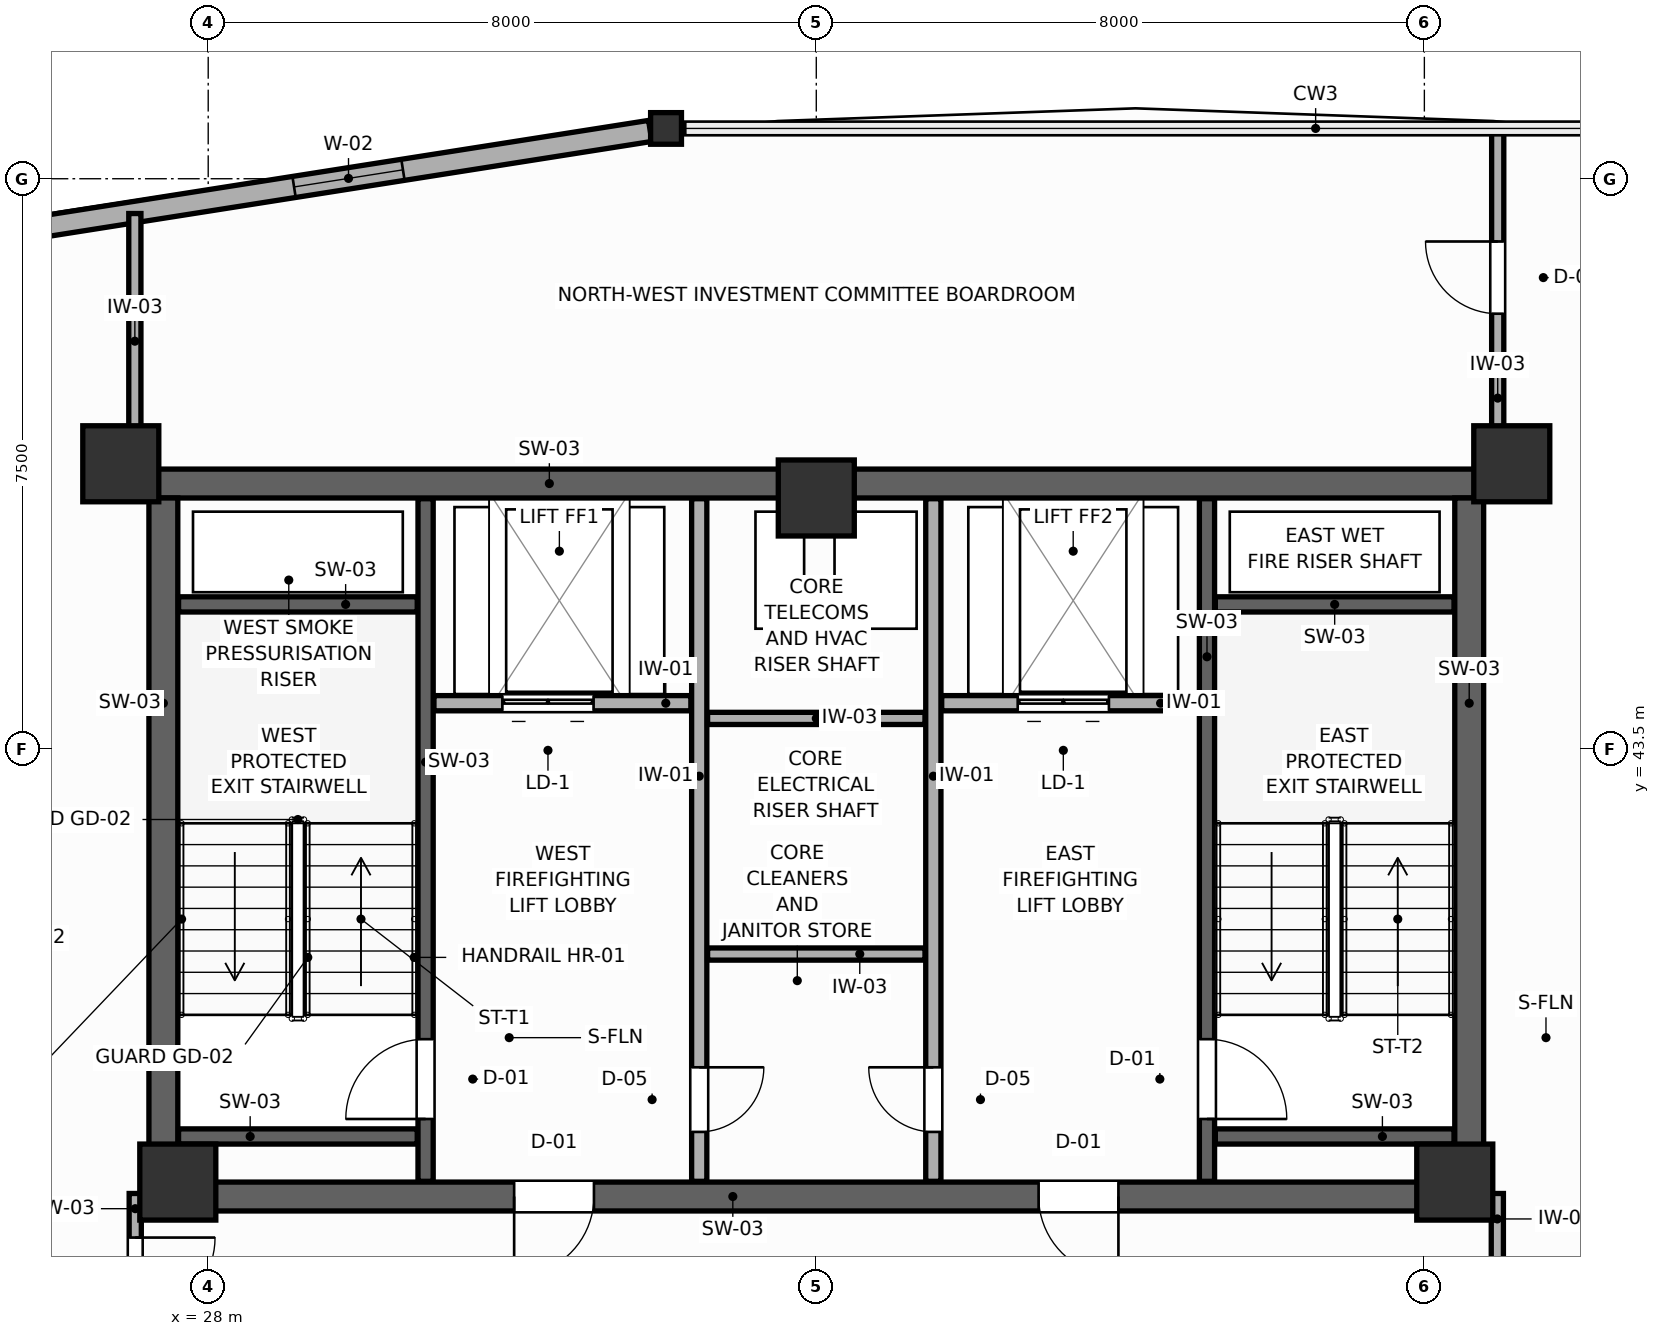
"""IFC4 building model, lengths in metres.
Left out: names, types, materials, properties, quantities, classifications, styles, units other than length and angle.
Written with IfcOpenShell. Run it as: python <this file> out.ifc"""

import sys

from ifc_helpers import new_model, si_unit, direction, frame, frame_2d, origin, origin_2d, place, context, subcontext, project, spatial, rectangle, i_section, extrude, source, transform, mapped, element, fill, save


model = new_model("IFC4")
c1 = context("Model", 3, precision=1e-05, world=origin(), true_north=direction((0.0, 1.0)))
c2 = subcontext(c1, "Body", "Model", "MODEL_VIEW")
j1 = project(units=[si_unit("LENGTHUNIT", "METRE"), si_unit("PLANEANGLEUNIT", "RADIAN")], contexts=[c1])
p1 = place(None, origin())
s1 = spatial("IfcSite", under=j1, at=p1, CompositionType="ELEMENT")
p2 = place(p1, origin())
s2 = spatial("IfcBuilding", under=s1, at=p2, CompositionType="ELEMENT")
p3 = place(p2, frame((0.0, 0.0, 209.4)))
s3 = spatial("IfcBuildingStorey", under=s2, at=p3, CompositionType="ELEMENT", Elevation=209.4)
p4 = place(p3, frame((27.22, 46.99, 0.0), z_axis=(0.0, 0.0, 1.0), x_axis=(1.0, 0.0, 0.0)))
e1 = element("IfcWall", 1, at=p4, inside=s3, PredefinedType="SHEAR", context=c2, shape_type="SweptSolid", body=[
    extrude(rectangle(XDim=17.56, YDim=0.38, at=frame_2d((8.78, 0.0))), origin(), (0.0, 0.0, 1.0), 3.6),
])
p5 = place(p3, frame((27.22, 37.61, 0.0), z_axis=(0.0, 0.0, 1.0), x_axis=(1.0, 0.0, 0.0)))
e2 = element("IfcWall", 2, at=p5, inside=s3, PredefinedType="SHEAR", context=c2, shape_type="SweptSolid", body=[
    extrude(rectangle(XDim=17.56, YDim=0.38, at=frame_2d((8.78, 0.0))), origin(), (0.0, 0.0, 1.0), 3.6),
])
p6 = place(p5, frame((4.805, 0.0, 0.0)))
e3 = element("IfcOpeningElement", 3, at=p6, cuts=e2, PredefinedType="OPENING", context=c2, shape_type="SweptSolid", body=[
    extrude(rectangle(XDim=1.05, YDim=2.1, at=frame_2d((0.525, 1.05))), frame((0.0, 0.2, 0.0), z_axis=(0.0, -1.0, 0.0), x_axis=(1.0, 0.0, 0.0)), (0.0, 0.0, 1.0), 0.4),
])
p7 = place(p5, frame((11.705, 0.0, 0.0)))
e4 = element("IfcOpeningElement", 4, at=p7, cuts=e2, PredefinedType="OPENING", context=c2, shape_type="SweptSolid", body=[
    extrude(rectangle(XDim=1.05, YDim=2.1, at=frame_2d((0.525, 1.05))), frame((0.0, 0.2, 0.0), z_axis=(0.0, -1.0, 0.0), x_axis=(1.0, 0.0, 0.0)), (0.0, 0.0, 1.0), 0.4),
])
for number, where, z_axis, x_axis in (
    (5, (27.41, 37.8, 0.0), (0.0, 0.0, 1.0), (0.0, 1.0, 0.0)),
    (6, (44.59, 37.8, 0.0), (0.0, 0.0, 1.0), (0.0, 1.0, 0.0)),
):
    element("IfcWall", number, at=place(p3, frame(where, z_axis=z_axis, x_axis=x_axis)), inside=s3, PredefinedType="SHEAR", context=c2, shape_type="SweptSolid", body=[
        extrude(rectangle(XDim=9.0, YDim=0.38, at=frame_2d((4.5, 0.0))), origin(), (0.0, 0.0, 1.0), 3.6),
    ])
m1 = source(origin(), c2, "Body", "SweptSolid", [
    extrude(rectangle(XDim=1.0, YDim=1.0, at=origin_2d()), origin(), (0.0, 0.0, 1.0), 3.6),
])
for number, where, z_axis, x_axis in (
    (7, (26.85, 47.25, 0.0), (0.0, 0.0, 1.0), (1.0, 0.0, 0.0)),
    (8, (45.15, 47.25, 0.0), (0.0, 0.0, 1.0), (1.0, 0.0, 0.0)),
    (9, (27.6, 37.8, 0.0), (0.0, 0.0, 1.0), (1.0, 0.0, 0.0)),
    (10, (44.4, 37.8, 0.0), (0.0, 0.0, 1.0), (1.0, 0.0, 0.0)),
    (11, (36.0, 46.8, 0.0), (0.0, 0.0, 1.0), (1.0, 0.0, 0.0)),
):
    element("IfcColumn", number, at=place(p3, frame(where, z_axis=z_axis, x_axis=x_axis)), inside=s3, PredefinedType="COLUMN", context=c2, shape_type="MappedRepresentation", body=[
        mapped(m1, transform((0.0, 0.0, 0.0), scale=1.0)),
    ])
m2 = source(origin(), c2, "Body", "SweptSolid", [
    extrude(i_section(OverallWidth=0.406, OverallDepth=0.416, WebThickness=0.027, FlangeThickness=0.044, FilletRadius=0.015, at=origin_2d()), origin(), (0.0, 0.0, 1.0), 3.6),
])
p8 = place(p3, frame((34.023, 51.662, 0.0), z_axis=(0.0, 0.0, 1.0), x_axis=(1.0, 0.0, 0.0)))
e12 = element("IfcColumn", 12, at=p8, inside=s3, PredefinedType="COLUMN", context=c2, shape_type="MappedRepresentation", body=[
    mapped(m2, transform((0.0, 0.0, 0.0), scale=1.0)),
])
p9 = place(p3, frame((33.815, 51.629, 0.0), z_axis=(0.0, 0.0, 1.0), x_axis=(-0.987848165878, -0.155422009936, 0.0)))
e13 = element("IfcWall", 13, at=p9, inside=s3, PredefinedType="SOLIDWALL", context=c2, shape_type="SweptSolid", body=[
    extrude(rectangle(XDim=13.823, YDim=0.28, at=frame_2d((6.912, 0.0))), origin(), (0.0, 0.0, 1.0), 2.96),
])
p10 = place(p9, frame((3.293, 0.0, 0.75)))
e14 = element("IfcOpeningElement", 14, at=p10, cuts=e13, PredefinedType="OPENING", context=c2, shape_type="SweptSolid", body=[
    extrude(rectangle(XDim=1.45, YDim=1.65, at=frame_2d((0.725, 0.825))), frame((0.0, 0.15, 0.0), z_axis=(0.0, -1.0, 0.0), x_axis=(1.0, 0.0, 0.0)), (0.0, 0.0, 1.0), 0.3),
])
p11 = place(p3, frame((30.86, 37.81, 0.0), z_axis=(0.0, 0.0, 1.0), x_axis=(0.0, 1.0, 0.0)))
e15 = element("IfcWall", 15, at=p11, inside=s3, PredefinedType="SHEAR", context=c2, shape_type="SweptSolid", body=[
    extrude(rectangle(XDim=8.98, YDim=0.2, at=frame_2d((4.49, 0.0))), origin(), (0.0, 0.0, 1.0), 3.6),
])
p12 = place(p11, frame((0.82, 0.0, 0.0)))
e16 = element("IfcOpeningElement", 16, at=p12, cuts=e15, PredefinedType="OPENING", context=c2, shape_type="SweptSolid", body=[
    extrude(rectangle(XDim=1.05, YDim=2.1, at=frame_2d((0.525, 1.05))), frame((0.0, 0.11, 0.0), z_axis=(0.0, -1.0, 0.0), x_axis=(1.0, 0.0, 0.0)), (0.0, 0.0, 1.0), 0.22),
])
for number, where, z_axis, x_axis in (
    (17, (27.61, 45.4, 0.0), (0.0, 0.0, 1.0), (1.0, 0.0, 0.0)),
    (18, (27.61, 38.4, 0.0), (0.0, 0.0, 1.0), (1.0, 0.0, 0.0)),
):
    element("IfcWall", number, at=place(p3, frame(where, z_axis=z_axis, x_axis=x_axis)), inside=s3, PredefinedType="SHEAR", context=c2, shape_type="SweptSolid", body=[
        extrude(rectangle(XDim=3.14, YDim=0.2, at=frame_2d((1.57, 0.0))), origin(), (0.0, 0.0, 1.0), 3.6),
    ])
p13 = place(p3, frame((41.14, 37.81, 0.0), z_axis=(0.0, 0.0, 1.0), x_axis=(0.0, 1.0, 0.0)))
e19 = element("IfcWall", 19, at=p13, inside=s3, PredefinedType="SHEAR", context=c2, shape_type="SweptSolid", body=[
    extrude(rectangle(XDim=8.98, YDim=0.2, at=frame_2d((4.49, 0.0))), origin(), (0.0, 0.0, 1.0), 3.6),
])
p14 = place(p13, frame((0.82, 0.0, 0.0)))
e20 = element("IfcOpeningElement", 20, at=p14, cuts=e19, PredefinedType="OPENING", context=c2, shape_type="SweptSolid", body=[
    extrude(rectangle(XDim=1.05, YDim=2.1, at=frame_2d((0.525, 1.05))), frame((0.0, 0.11, 0.0), z_axis=(0.0, -1.0, 0.0), x_axis=(1.0, 0.0, 0.0)), (0.0, 0.0, 1.0), 0.22),
])
for number, where, z_axis, x_axis in (
    (21, (41.25, 45.4, 0.0), (0.0, 0.0, 1.0), (1.0, 0.0, 0.0)),
    (22, (41.25, 38.4, 0.0), (0.0, 0.0, 1.0), (1.0, 0.0, 0.0)),
):
    element("IfcWall", number, at=place(p3, frame(where, z_axis=z_axis, x_axis=x_axis)), inside=s3, PredefinedType="SHEAR", context=c2, shape_type="SweptSolid", body=[
        extrude(rectangle(XDim=3.14, YDim=0.2, at=frame_2d((1.57, 0.0))), origin(), (0.0, 0.0, 1.0), 3.6),
    ])
p15 = place(p3, frame((30.97, 44.1, 0.0), z_axis=(0.0, 0.0, 1.0), x_axis=(1.0, 0.0, 0.0)))
e23 = element("IfcWall", 23, at=p15, inside=s3, PredefinedType="PARTITIONING", context=c2, shape_type="SweptSolid", body=[
    extrude(rectangle(XDim=3.38, YDim=0.2, at=frame_2d((1.69, 0.0))), origin(), (0.0, 0.0, 1.0), 3.41),
])
p16 = place(p15, frame((0.9, 0.0, 0.0)))
e24 = element("IfcOpeningElement", 24, at=p16, cuts=e23, PredefinedType="OPENING", context=c2, shape_type="SweptSolid", body=[
    extrude(rectangle(XDim=1.2, YDim=2.1, at=frame_2d((0.6, 1.05))), frame((0.0, 0.11, 0.0), z_axis=(0.0, -1.0, 0.0), x_axis=(1.0, 0.0, 0.0)), (0.0, 0.0, 1.0), 0.22),
])
p17 = place(p3, frame((37.65, 44.1, 0.0), z_axis=(0.0, 0.0, 1.0), x_axis=(1.0, 0.0, 0.0)))
e25 = element("IfcWall", 25, at=p17, inside=s3, PredefinedType="PARTITIONING", context=c2, shape_type="SweptSolid", body=[
    extrude(rectangle(XDim=3.38, YDim=0.2, at=frame_2d((1.69, 0.0))), origin(), (0.0, 0.0, 1.0), 3.41),
])
p18 = place(p17, frame((1.0, 0.0, 0.0)))
e26 = element("IfcOpeningElement", 26, at=p18, cuts=e25, PredefinedType="OPENING", context=c2, shape_type="SweptSolid", body=[
    extrude(rectangle(XDim=1.2, YDim=2.1, at=frame_2d((0.6, 1.05))), frame((0.0, 0.11, 0.0), z_axis=(0.0, -1.0, 0.0), x_axis=(1.0, 0.0, 0.0)), (0.0, 0.0, 1.0), 0.22),
])
p19 = place(p3, frame((34.46, 37.81, 0.0), z_axis=(0.0, 0.0, 1.0), x_axis=(0.0, 1.0, 0.0)))
e27 = element("IfcWall", 27, at=p19, inside=s3, PredefinedType="PARTITIONING", context=c2, shape_type="SweptSolid", body=[
    extrude(rectangle(XDim=8.98, YDim=0.2, at=frame_2d((4.49, 0.0))), origin(), (0.0, 0.0, 1.0), 3.41),
])
p20 = place(p19, frame((0.65, 0.0, 0.0)))
e28 = element("IfcOpeningElement", 28, at=p20, cuts=e27, PredefinedType="OPENING", context=c2, shape_type="SweptSolid", body=[
    extrude(rectangle(XDim=0.85, YDim=2.05, at=frame_2d((0.425, 1.025))), frame((0.0, 0.11, 0.0), z_axis=(0.0, -1.0, 0.0), x_axis=(1.0, 0.0, 0.0)), (0.0, 0.0, 1.0), 0.22),
])
p21 = place(p3, frame((37.54, 37.81, 0.0), z_axis=(0.0, 0.0, 1.0), x_axis=(0.0, 1.0, 0.0)))
e29 = element("IfcWall", 29, at=p21, inside=s3, PredefinedType="PARTITIONING", context=c2, shape_type="SweptSolid", body=[
    extrude(rectangle(XDim=8.98, YDim=0.2, at=frame_2d((4.49, 0.0))), origin(), (0.0, 0.0, 1.0), 3.41),
])
p22 = place(p21, frame((0.65, 0.0, 0.0)))
e30 = element("IfcOpeningElement", 30, at=p22, cuts=e29, PredefinedType="OPENING", context=c2, shape_type="SweptSolid", body=[
    extrude(rectangle(XDim=0.85, YDim=2.05, at=frame_2d((0.425, 1.025))), frame((0.0, 0.11, 0.0), z_axis=(0.0, -1.0, 0.0), x_axis=(1.0, 0.0, 0.0)), (0.0, 0.0, 1.0), 0.22),
])
for number, where, z_axis, x_axis in (
    (31, (34.57, 40.8, 0.0), (0.0, 0.0, 1.0), (1.0, 0.0, 0.0)),
    (32, (34.57, 43.9, 0.0), (0.0, 0.0, 1.0), (1.0, 0.0, 0.0)),
):
    element("IfcWall", number, at=place(p3, frame(where, z_axis=z_axis, x_axis=x_axis)), inside=s3, PredefinedType="PARTITIONING", context=c2, shape_type="SweptSolid", body=[
        extrude(rectangle(XDim=2.86, YDim=0.16, at=frame_2d((1.43, 0.0))), origin(), (0.0, 0.0, 1.0), 3.41),
    ])
p23 = place(p3, frame((27.04, 35.54, 0.0), z_axis=(0.0, 0.0, 1.0), x_axis=(0.0, 1.0, 0.0)))
e33 = element("IfcWall", 33, at=p23, inside=s3, PredefinedType="PARTITIONING", context=c2, shape_type="SweptSolid", body=[
    extrude(rectangle(XDim=2.11, YDim=0.16, at=frame_2d((1.055, 0.0))), origin(), (0.0, 0.0, 1.0), 3.41),
])
p24 = place(p23, frame((0.48, 0.0, 0.0)))
e34 = element("IfcOpeningElement", 34, at=p24, cuts=e33, PredefinedType="OPENING", context=c2, shape_type="SweptSolid", body=[
    extrude(rectangle(XDim=1.05, YDim=2.1, at=frame_2d((0.525, 1.05))), frame((0.0, 0.09, 0.0), z_axis=(0.0, -1.0, 0.0), x_axis=(1.0, 0.0, 0.0)), (0.0, 0.0, 1.0), 0.18),
])
p25 = place(p3, frame((44.96, 35.0, 0.0), z_axis=(0.0, 0.0, 1.0), x_axis=(0.0, 1.0, 0.0)))
e35 = element("IfcWall", 35, at=p25, inside=s3, PredefinedType="PARTITIONING", context=c2, shape_type="SweptSolid", body=[
    extrude(rectangle(XDim=2.65, YDim=0.16, at=frame_2d((1.325, 0.0))), origin(), (0.0, 0.0, 1.0), 3.41),
])
p26 = place(p25, frame((0.75, 0.0, 0.0)))
e36 = element("IfcOpeningElement", 36, at=p26, cuts=e35, PredefinedType="OPENING", context=c2, shape_type="SweptSolid", body=[
    extrude(rectangle(XDim=1.05, YDim=2.1, at=frame_2d((0.525, 1.05))), frame((0.0, 0.09, 0.0), z_axis=(0.0, -1.0, 0.0), x_axis=(1.0, 0.0, 0.0)), (0.0, 0.0, 1.0), 0.18),
])
p27 = place(p3, frame((44.965, 47.183, 0.0), z_axis=(0.0, 0.0, 1.0), x_axis=(0.0, 1.0, 0.0)))
e37 = element("IfcWall", 37, at=p27, inside=s3, PredefinedType="PARTITIONING", context=c2, shape_type="SweptSolid", body=[
    extrude(rectangle(XDim=4.458, YDim=0.16, at=frame_2d((2.229, 0.0))), origin(), (0.0, 0.0, 1.0), 3.41),
])
p28 = place(p27, frame((2.041, 0.0, 0.0)))
e38 = element("IfcOpeningElement", 38, at=p28, cuts=e37, PredefinedType="OPENING", context=c2, shape_type="SweptSolid", body=[
    extrude(rectangle(XDim=0.95, YDim=2.05, at=frame_2d((0.475, 1.025))), frame((0.0, 0.09, 0.0), z_axis=(0.0, -1.0, 0.0), x_axis=(1.0, 0.0, 0.0)), (0.0, 0.0, 1.0), 0.18),
])
p29 = place(p3, frame((27.035, 47.183, 0.0), z_axis=(0.0, 0.0, 1.0), x_axis=(0.0, 1.0, 0.0)))
e39 = element("IfcWall", 39, at=p29, inside=s3, PredefinedType="PARTITIONING", context=c2, shape_type="SweptSolid", body=[
    extrude(rectangle(XDim=3.359, YDim=0.16, at=frame_2d((1.68, 0.0))), origin(), (0.0, 0.0, 1.0), 3.41),
])
p30 = place(p10, origin())
e40 = element("IfcWindow", 40, at=p30, inside=s3, PartitioningType="SINGLE_PANEL", PredefinedType="WINDOW", context=c2, shape_type="SweptSolid", body=[
    extrude(rectangle(XDim=1.45, YDim=1.65, at=frame_2d((0.725, 0.825))), frame((0.0, 0.03, 0.0), z_axis=(0.0, -1.0, 0.0), x_axis=(1.0, 0.0, 0.0)), (0.0, 0.0, 1.0), 0.06),
])
fill(e14, e40)
p31 = place(p12, origin())
e41 = element("IfcDoor", 41, at=p31, inside=s3, OperationType="SINGLE_SWING_LEFT", PredefinedType="DOOR", context=c2, shape_type="SweptSolid", body=[
    extrude(rectangle(XDim=1.05, YDim=2.1, at=frame_2d((0.525, 1.05))), frame((0.0, 0.025, 0.0), z_axis=(0.0, -1.0, 0.0), x_axis=(1.0, 0.0, 0.0)), (0.0, 0.0, 1.0), 0.05),
])
fill(e16, e41)
p32 = place(p14, frame((1.05, 0.0, 0.0), z_axis=(0.0, 0.0, 1.0), x_axis=(-1.0, 0.0, 0.0)))
e42 = element("IfcDoor", 42, at=p32, inside=s3, OperationType="SINGLE_SWING_RIGHT", PredefinedType="DOOR", context=c2, shape_type="SweptSolid", body=[
    extrude(rectangle(XDim=1.05, YDim=2.1, at=frame_2d((0.525, 1.05))), frame((0.0, 0.025, 0.0), z_axis=(0.0, -1.0, 0.0), x_axis=(1.0, 0.0, 0.0)), (0.0, 0.0, 1.0), 0.05),
])
fill(e20, e42)
p33 = place(p16, origin())
e43 = element("IfcDoor", 43, at=p33, inside=s3, OperationType="DOUBLE_DOOR_SLIDING", PredefinedType="DOOR", context=c2, shape_type="SweptSolid", body=[
    extrude(rectangle(XDim=1.2, YDim=2.1, at=frame_2d((0.6, 1.05))), frame((0.0, 0.025, 0.0), z_axis=(0.0, -1.0, 0.0), x_axis=(1.0, 0.0, 0.0)), (0.0, 0.0, 1.0), 0.05),
])
fill(e24, e43)
p34 = place(p18, origin())
e44 = element("IfcDoor", 44, at=p34, inside=s3, OperationType="DOUBLE_DOOR_SLIDING", PredefinedType="DOOR", context=c2, shape_type="SweptSolid", body=[
    extrude(rectangle(XDim=1.2, YDim=2.1, at=frame_2d((0.6, 1.05))), frame((0.0, 0.025, 0.0), z_axis=(0.0, -1.0, 0.0), x_axis=(1.0, 0.0, 0.0)), (0.0, 0.0, 1.0), 0.05),
])
fill(e26, e44)
p35 = place(p20, frame((0.85, 0.0, 0.0), z_axis=(0.0, 0.0, 1.0), x_axis=(-1.0, 0.0, 0.0)))
e45 = element("IfcDoor", 45, at=p35, inside=s3, OperationType="SINGLE_SWING_LEFT", PredefinedType="DOOR", context=c2, shape_type="SweptSolid", body=[
    extrude(rectangle(XDim=0.85, YDim=2.05, at=frame_2d((0.425, 1.025))), frame((0.0, 0.025, 0.0), z_axis=(0.0, -1.0, 0.0), x_axis=(1.0, 0.0, 0.0)), (0.0, 0.0, 1.0), 0.05),
])
fill(e28, e45)
p36 = place(p22, origin())
e46 = element("IfcDoor", 46, at=p36, inside=s3, OperationType="SINGLE_SWING_RIGHT", PredefinedType="DOOR", context=c2, shape_type="SweptSolid", body=[
    extrude(rectangle(XDim=0.85, YDim=2.05, at=frame_2d((0.425, 1.025))), frame((0.0, 0.025, 0.0), z_axis=(0.0, -1.0, 0.0), x_axis=(1.0, 0.0, 0.0)), (0.0, 0.0, 1.0), 0.05),
])
fill(e30, e46)
p37 = place(p24, frame((1.05, 0.0, 0.0), z_axis=(0.0, 0.0, 1.0), x_axis=(-1.0, 0.0, 0.0)))
e47 = element("IfcDoor", 47, at=p37, inside=s3, OperationType="SINGLE_SWING_LEFT", PredefinedType="DOOR", context=c2, shape_type="SweptSolid", body=[
    extrude(rectangle(XDim=1.05, YDim=2.1, at=frame_2d((0.525, 1.05))), frame((0.0, 0.025, 0.0), z_axis=(0.0, -1.0, 0.0), x_axis=(1.0, 0.0, 0.0)), (0.0, 0.0, 1.0), 0.05),
])
fill(e34, e47)
p38 = place(p28, origin())
e48 = element("IfcDoor", 48, at=p38, inside=s3, OperationType="SINGLE_SWING_RIGHT", PredefinedType="DOOR", context=c2, shape_type="SweptSolid", body=[
    extrude(rectangle(XDim=0.95, YDim=2.05, at=frame_2d((0.475, 1.025))), frame((0.0, 0.025, 0.0), z_axis=(0.0, -1.0, 0.0), x_axis=(1.0, 0.0, 0.0)), (0.0, 0.0, 1.0), 0.05),
])
fill(e38, e48)
p39 = place(p6, frame((1.05, 0.0, 0.0), z_axis=(0.0, 0.0, 1.0), x_axis=(-1.0, 0.0, 0.0)))
e49 = element("IfcDoor", 49, at=p39, inside=s3, OperationType="SINGLE_SWING_RIGHT", PredefinedType="DOOR", context=c2, shape_type="SweptSolid", body=[
    extrude(rectangle(XDim=1.05, YDim=2.1, at=frame_2d((0.525, 1.05))), frame((0.0, 0.025, 0.0), z_axis=(0.0, -1.0, 0.0), x_axis=(1.0, 0.0, 0.0)), (0.0, 0.0, 1.0), 0.05),
])
fill(e3, e49)
p40 = place(p7, frame((1.05, 0.0, 0.0), z_axis=(0.0, 0.0, 1.0), x_axis=(-1.0, 0.0, 0.0)))
e50 = element("IfcDoor", 50, at=p40, inside=s3, OperationType="SINGLE_SWING_LEFT", PredefinedType="DOOR", context=c2, shape_type="SweptSolid", body=[
    extrude(rectangle(XDim=1.05, YDim=2.1, at=frame_2d((0.525, 1.05))), frame((0.0, 0.025, 0.0), z_axis=(0.0, -1.0, 0.0), x_axis=(1.0, 0.0, 0.0)), (0.0, 0.0, 1.0), 0.05),
])
fill(e4, e50)
save(model, sys.argv[1])
